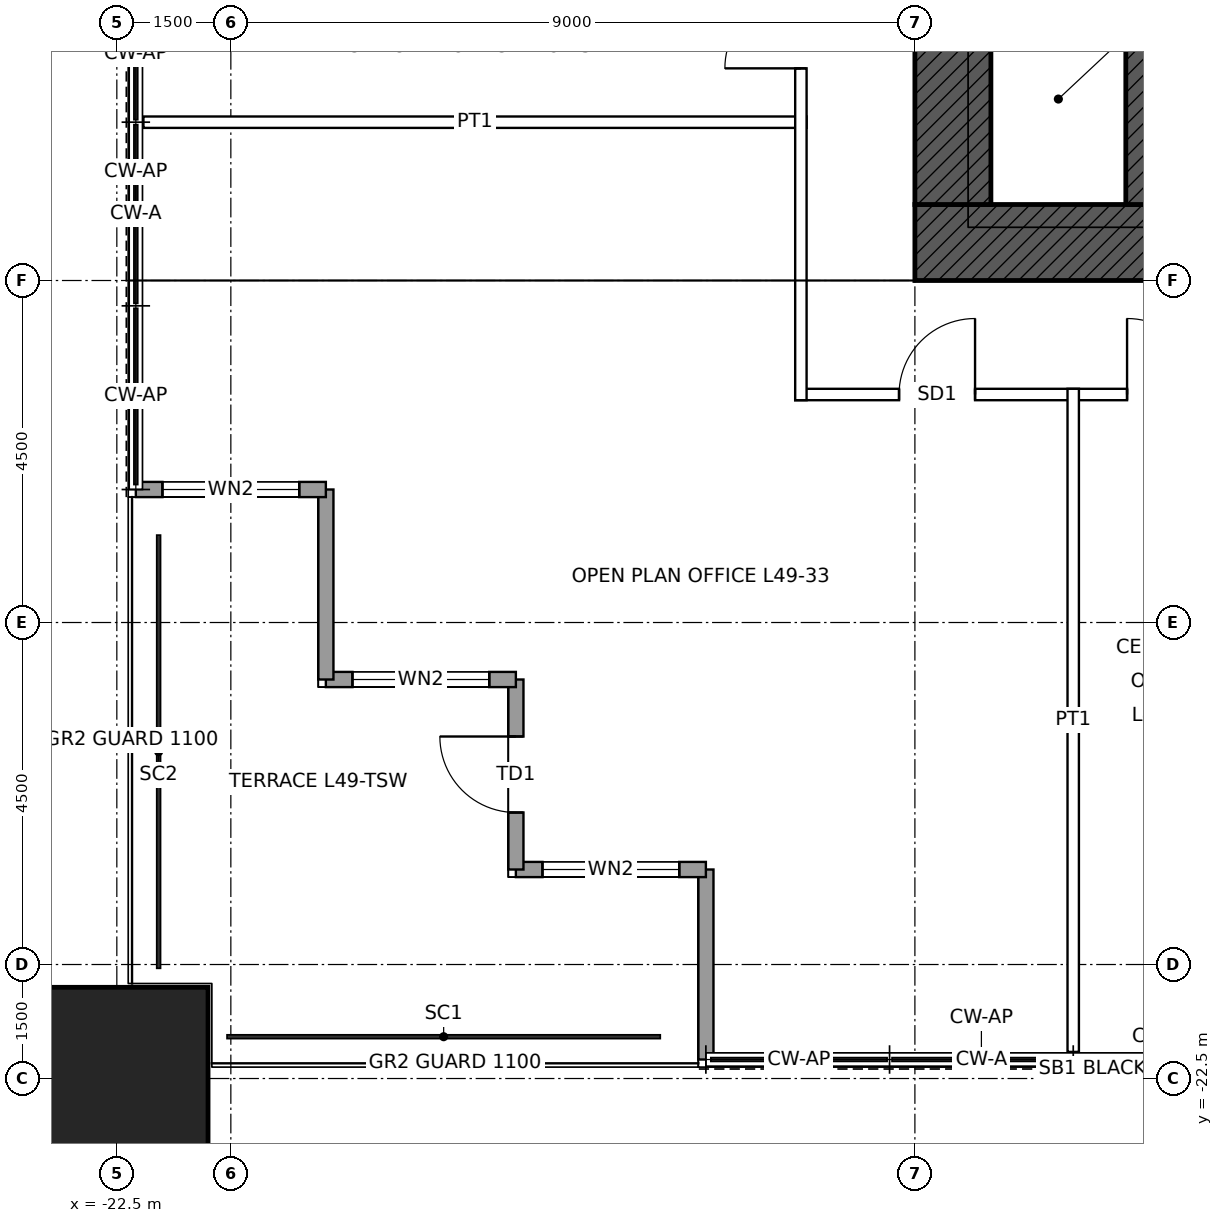
"""IFC4 building model, lengths in metres.
Left out: names, types, materials, properties, quantities, classifications, styles, units other than length and angle.
Written with IfcOpenShell. Run it as: python <this file> out.ifc"""

import sys

from ifc_helpers import new_model, si_unit, direction, frame, frame_2d, origin, origin_2d, place, context, subcontext, project, spatial, rectangle, hollow_rectangle, extrude, element, fill, save


model = new_model("IFC4")
c1 = context("Model", 3, precision=1e-05, world=origin(), true_north=direction((0.0, 1.0)))
c2 = subcontext(c1, "Body", "Model", "MODEL_VIEW")
j1 = project(units=[si_unit("LENGTHUNIT", "METRE"), si_unit("PLANEANGLEUNIT", "RADIAN")], contexts=[c1])
p1 = place(None, origin())
s1 = spatial("IfcSite", under=j1, at=p1, CompositionType="ELEMENT")
p2 = place(p1, origin())
s2 = spatial("IfcBuilding", under=s1, at=p2, CompositionType="ELEMENT")
p3 = place(p2, frame((0.0, 0.0, 229.9)))
s3 = spatial("IfcBuildingStorey", under=s2, at=p3, CompositionType="ELEMENT", Elevation=229.9)
p4 = place(p3, frame((-22.5, -22.5, 0.0), z_axis=(0.0, 0.0, 1.0), x_axis=(1.0, 0.0, 0.0)))
e1 = element("IfcColumn", 1, at=p4, inside=s3, PredefinedType="COLUMN", context=c2, shape_type="SweptSolid", body=[
    extrude(hollow_rectangle(XDim=2.4, YDim=2.4, WallThickness=0.12, at=origin_2d()), origin(), (0.0, 0.0, 1.0), 4.0),
])
p5 = place(p3, frame((12.0, -11.5, 0.0), z_axis=(0.0, 0.0, 1.0), x_axis=(-1.0, 0.0, 0.0)))
e2 = element("IfcWall", 2, at=p5, inside=s3, PredefinedType="SHEAR", context=c2, shape_type="SweptSolid", body=[
    extrude(rectangle(XDim=24.0, YDim=1.0, at=frame_2d((12.0, 0.0))), origin(), (0.0, 0.0, 1.0), 4.0),
])
p6 = place(p5, frame((11.5, 0.0, 0.0)))
e3 = element("IfcOpeningElement", 3, at=p6, cuts=e2, PredefinedType="OPENING", context=c2, shape_type="SweptSolid", body=[
    extrude(rectangle(XDim=1.0, YDim=2.1, at=frame_2d((0.5, 1.05))), frame((0.0, 0.51, 0.0), z_axis=(0.0, -1.0, 0.0), x_axis=(1.0, 0.0, 0.0)), (0.0, 0.0, 1.0), 1.02),
])
p7 = place(p5, frame((1.0, 0.0, 0.0)))
e4 = element("IfcOpeningElement", 4, at=p7, cuts=e2, PredefinedType="OPENING", context=c2, shape_type="SweptSolid", body=[
    extrude(rectangle(XDim=1.0, YDim=2.4, at=frame_2d((0.5, 1.2))), frame((0.0, 0.51, 0.0), z_axis=(0.0, -1.0, 0.0), x_axis=(1.0, 0.0, 0.0)), (0.0, 0.0, 1.0), 1.02),
])
p8 = place(p3, frame((-11.5, -11.0, 0.0), z_axis=(0.0, 0.0, 1.0), x_axis=(0.0, 1.0, 0.0)))
e5 = element("IfcWall", 5, at=p8, inside=s3, PredefinedType="SHEAR", context=c2, shape_type="SweptSolid", body=[
    extrude(rectangle(XDim=22.0, YDim=1.0, at=frame_2d((11.0, 0.0))), origin(), (0.0, 0.0, 1.0), 4.0),
])
p9 = place(p8, frame((10.5, 0.0, 0.0)))
e6 = element("IfcOpeningElement", 6, at=p9, cuts=e5, PredefinedType="OPENING", context=c2, shape_type="SweptSolid", body=[
    extrude(rectangle(XDim=1.0, YDim=2.4, at=frame_2d((0.5, 1.2))), frame((0.0, 0.51, 0.0), z_axis=(0.0, -1.0, 0.0), x_axis=(1.0, 0.0, 0.0)), (0.0, 0.0, 1.0), 1.02),
])
p10 = place(p3, frame((-9.0, -11.0, 0.0), z_axis=(0.0, 0.0, 1.0), x_axis=(0.0, 1.0, 0.0)))
e7 = element("IfcWall", 7, at=p10, inside=s3, PredefinedType="SHEAR", context=c2, shape_type="SweptSolid", body=[
    extrude(rectangle(XDim=6.5, YDim=0.45, at=frame_2d((3.25, 0.0))), origin(), (0.0, 0.0, 1.0), 4.0),
])
p11 = place(p10, frame((4.25, 0.0, 0.0)))
e8 = element("IfcOpeningElement", 8, at=p11, cuts=e7, PredefinedType="OPENING", context=c2, shape_type="SweptSolid", body=[
    extrude(rectangle(XDim=1.0, YDim=2.1, at=frame_2d((0.5, 1.05))), frame((0.0, 0.235, 0.0), z_axis=(0.0, -1.0, 0.0), x_axis=(1.0, 0.0, 0.0)), (0.0, 0.0, 1.0), 0.47),
])
p12 = place(p3, frame((-14.75, -22.25, 0.0), z_axis=(0.0, 0.0, 1.0), x_axis=(0.0, 1.0, 0.0)))
e9 = element("IfcWall", 9, at=p12, inside=s3, PredefinedType="SOLIDWALL", context=c2, shape_type="SweptSolid", body=[
    extrude(rectangle(XDim=2.5, YDim=0.2, at=frame_2d((1.25, 0.0))), origin(), (0.0, 0.0, 1.0), 3.85),
])
p13 = place(p3, frame((-14.75, -19.75, 0.0), z_axis=(0.0, 0.0, 1.0), x_axis=(-1.0, 0.0, 0.0)))
e10 = element("IfcWall", 10, at=p13, inside=s3, PredefinedType="SOLIDWALL", context=c2, shape_type="SweptSolid", body=[
    extrude(rectangle(XDim=2.5, YDim=0.2, at=frame_2d((1.25, 0.0))), origin(), (0.0, 0.0, 1.0), 3.85),
])
p14 = place(p13, frame((0.35, 0.0, 0.3)))
e11 = element("IfcOpeningElement", 11, at=p14, cuts=e10, PredefinedType="OPENING", context=c2, shape_type="SweptSolid", body=[
    extrude(rectangle(XDim=1.8, YDim=2.4, at=frame_2d((0.9, 1.2))), frame((0.0, 0.11, 0.0), z_axis=(0.0, -1.0, 0.0), x_axis=(1.0, 0.0, 0.0)), (0.0, 0.0, 1.0), 0.22),
])
p15 = place(p3, frame((-17.25, -19.75, 0.0), z_axis=(0.0, 0.0, 1.0), x_axis=(0.0, 1.0, 0.0)))
e12 = element("IfcWall", 12, at=p15, inside=s3, PredefinedType="SOLIDWALL", context=c2, shape_type="SweptSolid", body=[
    extrude(rectangle(XDim=2.5, YDim=0.2, at=frame_2d((1.25, 0.0))), origin(), (0.0, 0.0, 1.0), 3.85),
])
p16 = place(p15, frame((0.75, 0.0, 0.0)))
e13 = element("IfcOpeningElement", 13, at=p16, cuts=e12, PredefinedType="OPENING", context=c2, shape_type="SweptSolid", body=[
    extrude(rectangle(XDim=1.0, YDim=2.4, at=frame_2d((0.5, 1.2))), frame((0.0, 0.11, 0.0), z_axis=(0.0, -1.0, 0.0), x_axis=(1.0, 0.0, 0.0)), (0.0, 0.0, 1.0), 0.22),
])
p17 = place(p3, frame((-17.25, -17.25, 0.0), z_axis=(0.0, 0.0, 1.0), x_axis=(-1.0, 0.0, 0.0)))
e14 = element("IfcWall", 14, at=p17, inside=s3, PredefinedType="SOLIDWALL", context=c2, shape_type="SweptSolid", body=[
    extrude(rectangle(XDim=2.5, YDim=0.2, at=frame_2d((1.25, 0.0))), origin(), (0.0, 0.0, 1.0), 3.85),
])
p18 = place(p17, frame((0.35, 0.0, 0.3)))
e15 = element("IfcOpeningElement", 15, at=p18, cuts=e14, PredefinedType="OPENING", context=c2, shape_type="SweptSolid", body=[
    extrude(rectangle(XDim=1.8, YDim=2.4, at=frame_2d((0.9, 1.2))), frame((0.0, 0.11, 0.0), z_axis=(0.0, -1.0, 0.0), x_axis=(1.0, 0.0, 0.0)), (0.0, 0.0, 1.0), 0.22),
])
p19 = place(p3, frame((-19.75, -17.25, 0.0), z_axis=(0.0, 0.0, 1.0), x_axis=(0.0, 1.0, 0.0)))
e16 = element("IfcWall", 16, at=p19, inside=s3, PredefinedType="SOLIDWALL", context=c2, shape_type="SweptSolid", body=[
    extrude(rectangle(XDim=2.5, YDim=0.2, at=frame_2d((1.25, 0.0))), origin(), (0.0, 0.0, 1.0), 3.85),
])
p20 = place(p3, frame((-19.75, -14.75, 0.0), z_axis=(0.0, 0.0, 1.0), x_axis=(-1.0, 0.0, 0.0)))
e17 = element("IfcWall", 17, at=p20, inside=s3, PredefinedType="SOLIDWALL", context=c2, shape_type="SweptSolid", body=[
    extrude(rectangle(XDim=2.5, YDim=0.2, at=frame_2d((1.25, 0.0))), origin(), (0.0, 0.0, 1.0), 3.85),
])
p21 = place(p20, frame((0.35, 0.0, 0.3)))
e18 = element("IfcOpeningElement", 18, at=p21, cuts=e17, PredefinedType="OPENING", context=c2, shape_type="SweptSolid", body=[
    extrude(rectangle(XDim=1.8, YDim=2.4, at=frame_2d((0.9, 1.2))), frame((0.0, 0.11, 0.0), z_axis=(0.0, -1.0, 0.0), x_axis=(1.0, 0.0, 0.0)), (0.0, 0.0, 1.0), 0.22),
])
p22 = place(p3, frame((-13.575, -13.5, 0.0), z_axis=(0.0, 0.0, 1.0), x_axis=(1.0, 0.0, 0.0)))
e19 = element("IfcWall", 19, at=p22, inside=s3, PredefinedType="PARTITIONING", context=c2, shape_type="SweptSolid", body=[
    extrude(rectangle(XDim=27.15, YDim=0.15, at=frame_2d((13.575, 0.0))), origin(), (0.0, 0.0, 1.0), 3.85),
])
p23 = place(p22, frame((21.783, 0.0, 0.0)))
e20 = element("IfcOpeningElement", 20, at=p23, cuts=e19, PredefinedType="OPENING", context=c2, shape_type="SweptSolid", body=[
    extrude(rectangle(XDim=1.0, YDim=2.1, at=frame_2d((0.5, 1.05))), frame((0.0, 0.085, 0.0), z_axis=(0.0, -1.0, 0.0), x_axis=(1.0, 0.0, 0.0)), (0.0, 0.0, 1.0), 0.17),
])
p24 = place(p22, frame((19.325, 0.0, 0.0)))
e21 = element("IfcOpeningElement", 21, at=p24, cuts=e19, PredefinedType="OPENING", context=c2, shape_type="SweptSolid", body=[
    extrude(rectangle(XDim=1.0, YDim=2.1, at=frame_2d((0.5, 1.05))), frame((0.0, 0.085, 0.0), z_axis=(0.0, -1.0, 0.0), x_axis=(1.0, 0.0, 0.0)), (0.0, 0.0, 1.0), 0.17),
])
p25 = place(p22, frame((16.825, 0.0, 0.0)))
e22 = element("IfcOpeningElement", 22, at=p25, cuts=e19, PredefinedType="OPENING", context=c2, shape_type="SweptSolid", body=[
    extrude(rectangle(XDim=1.0, YDim=2.1, at=frame_2d((0.5, 1.05))), frame((0.0, 0.085, 0.0), z_axis=(0.0, -1.0, 0.0), x_axis=(1.0, 0.0, 0.0)), (0.0, 0.0, 1.0), 0.17),
])
p26 = place(p22, frame((14.675, 0.0, 0.0)))
e23 = element("IfcOpeningElement", 23, at=p26, cuts=e19, PredefinedType="OPENING", context=c2, shape_type="SweptSolid", body=[
    extrude(rectangle(XDim=1.0, YDim=2.1, at=frame_2d((0.5, 1.05))), frame((0.0, 0.085, 0.0), z_axis=(0.0, -1.0, 0.0), x_axis=(1.0, 0.0, 0.0)), (0.0, 0.0, 1.0), 0.17),
])
p27 = place(p22, frame((11.475, 0.0, 0.0)))
e24 = element("IfcOpeningElement", 24, at=p27, cuts=e19, PredefinedType="OPENING", context=c2, shape_type="SweptSolid", body=[
    extrude(rectangle(XDim=1.0, YDim=2.1, at=frame_2d((0.5, 1.05))), frame((0.0, 0.085, 0.0), z_axis=(0.0, -1.0, 0.0), x_axis=(1.0, 0.0, 0.0)), (0.0, 0.0, 1.0), 0.17),
])
p28 = place(p22, frame((9.325, 0.0, 0.0)))
e25 = element("IfcOpeningElement", 25, at=p28, cuts=e19, PredefinedType="OPENING", context=c2, shape_type="SweptSolid", body=[
    extrude(rectangle(XDim=1.0, YDim=2.1, at=frame_2d((0.5, 1.05))), frame((0.0, 0.085, 0.0), z_axis=(0.0, -1.0, 0.0), x_axis=(1.0, 0.0, 0.0)), (0.0, 0.0, 1.0), 0.17),
])
p29 = place(p22, frame((6.825, 0.0, 0.0)))
e26 = element("IfcOpeningElement", 26, at=p29, cuts=e19, PredefinedType="OPENING", context=c2, shape_type="SweptSolid", body=[
    extrude(rectangle(XDim=1.0, YDim=2.1, at=frame_2d((0.5, 1.05))), frame((0.0, 0.085, 0.0), z_axis=(0.0, -1.0, 0.0), x_axis=(1.0, 0.0, 0.0)), (0.0, 0.0, 1.0), 0.17),
])
p30 = place(p22, frame((4.366, 0.0, 0.0)))
e27 = element("IfcOpeningElement", 27, at=p30, cuts=e19, PredefinedType="OPENING", context=c2, shape_type="SweptSolid", body=[
    extrude(rectangle(XDim=1.0, YDim=2.1, at=frame_2d((0.5, 1.05))), frame((0.0, 0.085, 0.0), z_axis=(0.0, -1.0, 0.0), x_axis=(1.0, 0.0, 0.0)), (0.0, 0.0, 1.0), 0.17),
])
p31 = place(p22, frame((25.318, 0.0, 0.0)))
e28 = element("IfcOpeningElement", 28, at=p31, cuts=e19, PredefinedType="OPENING", context=c2, shape_type="SweptSolid", body=[
    extrude(rectangle(XDim=1.0, YDim=2.4, at=frame_2d((0.5, 1.2))), frame((0.0, 0.085, 0.0), z_axis=(0.0, -1.0, 0.0), x_axis=(1.0, 0.0, 0.0)), (0.0, 0.0, 1.0), 0.17),
])
p32 = place(p22, frame((1.366, 0.0, 0.0)))
e29 = element("IfcOpeningElement", 29, at=p32, cuts=e19, PredefinedType="OPENING", context=c2, shape_type="SweptSolid", body=[
    extrude(rectangle(XDim=1.0, YDim=2.4, at=frame_2d((0.5, 1.2))), frame((0.0, 0.085, 0.0), z_axis=(0.0, -1.0, 0.0), x_axis=(1.0, 0.0, 0.0)), (0.0, 0.0, 1.0), 0.17),
])
p33 = place(p3, frame((-22.15, -9.917, 0.0), z_axis=(0.0, 0.0, 1.0), x_axis=(1.0, 0.0, 0.0)))
e30 = element("IfcWall", 30, at=p33, inside=s3, PredefinedType="PARTITIONING", context=c2, shape_type="SweptSolid", body=[
    extrude(rectangle(XDim=8.725, YDim=0.15, at=frame_2d((4.362, 0.0))), origin(), (0.0, 0.0, 1.0), 3.85),
])
p34 = place(p3, frame((-13.5, -13.575, 0.0), z_axis=(0.0, 0.0, 1.0), x_axis=(0.0, 1.0, 0.0)))
e31 = element("IfcWall", 31, at=p34, inside=s3, PredefinedType="PARTITIONING", context=c2, shape_type="SweptSolid", body=[
    extrude(rectangle(XDim=13.65, YDim=0.15, at=frame_2d((6.825, 0.0))), origin(), (0.0, 0.0, 1.0), 3.85),
])
p35 = place(p34, frame((4.366, 0.0, 0.0)))
e32 = element("IfcOpeningElement", 32, at=p35, cuts=e31, PredefinedType="OPENING", context=c2, shape_type="SweptSolid", body=[
    extrude(rectangle(XDim=1.0, YDim=2.1, at=frame_2d((0.5, 1.05))), frame((0.0, 0.085, 0.0), z_axis=(0.0, -1.0, 0.0), x_axis=(1.0, 0.0, 0.0)), (0.0, 0.0, 1.0), 0.17),
])
p36 = place(p34, frame((6.825, 0.0, 0.0)))
e33 = element("IfcOpeningElement", 33, at=p36, cuts=e31, PredefinedType="OPENING", context=c2, shape_type="SweptSolid", body=[
    extrude(rectangle(XDim=1.0, YDim=2.1, at=frame_2d((0.5, 1.05))), frame((0.0, 0.085, 0.0), z_axis=(0.0, -1.0, 0.0), x_axis=(1.0, 0.0, 0.0)), (0.0, 0.0, 1.0), 0.17),
])
p37 = place(p34, frame((9.325, 0.0, 0.0)))
e34 = element("IfcOpeningElement", 34, at=p37, cuts=e31, PredefinedType="OPENING", context=c2, shape_type="SweptSolid", body=[
    extrude(rectangle(XDim=1.0, YDim=2.1, at=frame_2d((0.5, 1.05))), frame((0.0, 0.085, 0.0), z_axis=(0.0, -1.0, 0.0), x_axis=(1.0, 0.0, 0.0)), (0.0, 0.0, 1.0), 0.17),
])
p38 = place(p34, frame((11.475, 0.0, 0.0)))
e35 = element("IfcOpeningElement", 35, at=p38, cuts=e31, PredefinedType="OPENING", context=c2, shape_type="SweptSolid", body=[
    extrude(rectangle(XDim=1.0, YDim=2.1, at=frame_2d((0.5, 1.05))), frame((0.0, 0.085, 0.0), z_axis=(0.0, -1.0, 0.0), x_axis=(1.0, 0.0, 0.0)), (0.0, 0.0, 1.0), 0.17),
])
p39 = place(p3, frame((-9.917, -22.15, 0.0), z_axis=(0.0, 0.0, 1.0), x_axis=(0.0, 1.0, 0.0)))
e36 = element("IfcWall", 36, at=p39, inside=s3, PredefinedType="PARTITIONING", context=c2, shape_type="SweptSolid", body=[
    extrude(rectangle(XDim=8.725, YDim=0.15, at=frame_2d((4.362, 0.0))), origin(), (0.0, 0.0, 1.0), 3.85),
])
p40 = place(p14, origin())
e37 = element("IfcWindow", 37, at=p40, inside=s3, PartitioningType="SINGLE_PANEL", PredefinedType="WINDOW", context=c2, shape_type="SweptSolid", body=[
    extrude(rectangle(XDim=1.8, YDim=2.4, at=frame_2d((0.9, 1.2))), frame((0.0, 0.03, 0.0), z_axis=(0.0, -1.0, 0.0), x_axis=(1.0, 0.0, 0.0)), (0.0, 0.0, 1.0), 0.06),
])
fill(e11, e37)
p41 = place(p16, origin())
e38 = element("IfcDoor", 38, at=p41, inside=s3, OperationType="SINGLE_SWING_RIGHT", PredefinedType="DOOR", context=c2, shape_type="SweptSolid", body=[
    extrude(rectangle(XDim=1.0, YDim=2.4, at=frame_2d((0.5, 1.2))), frame((0.0, 0.025, 0.0), z_axis=(0.0, -1.0, 0.0), x_axis=(1.0, 0.0, 0.0)), (0.0, 0.0, 1.0), 0.05),
])
fill(e13, e38)
p42 = place(p18, origin())
e39 = element("IfcWindow", 39, at=p42, inside=s3, PartitioningType="SINGLE_PANEL", PredefinedType="WINDOW", context=c2, shape_type="SweptSolid", body=[
    extrude(rectangle(XDim=1.8, YDim=2.4, at=frame_2d((0.9, 1.2))), frame((0.0, 0.03, 0.0), z_axis=(0.0, -1.0, 0.0), x_axis=(1.0, 0.0, 0.0)), (0.0, 0.0, 1.0), 0.06),
])
fill(e15, e39)
p43 = place(p21, origin())
e40 = element("IfcWindow", 40, at=p43, inside=s3, PartitioningType="SINGLE_PANEL", PredefinedType="WINDOW", context=c2, shape_type="SweptSolid", body=[
    extrude(rectangle(XDim=1.8, YDim=2.4, at=frame_2d((0.9, 1.2))), frame((0.0, 0.03, 0.0), z_axis=(0.0, -1.0, 0.0), x_axis=(1.0, 0.0, 0.0)), (0.0, 0.0, 1.0), 0.06),
])
fill(e18, e40)
p44 = place(p30, origin())
e41 = element("IfcDoor", 41, at=p44, inside=s3, OperationType="SINGLE_SWING_LEFT", PredefinedType="DOOR", context=c2, shape_type="SweptSolid", body=[
    extrude(rectangle(XDim=1.0, YDim=2.1, at=frame_2d((0.5, 1.05))), frame((0.0, 0.025, 0.0), z_axis=(0.0, -1.0, 0.0), x_axis=(1.0, 0.0, 0.0)), (0.0, 0.0, 1.0), 0.05),
])
fill(e27, e41)
p45 = place(p35, origin())
e42 = element("IfcDoor", 42, at=p45, inside=s3, OperationType="SINGLE_SWING_LEFT", PredefinedType="DOOR", context=c2, shape_type="SweptSolid", body=[
    extrude(rectangle(XDim=1.0, YDim=2.1, at=frame_2d((0.5, 1.05))), frame((0.0, 0.025, 0.0), z_axis=(0.0, -1.0, 0.0), x_axis=(1.0, 0.0, 0.0)), (0.0, 0.0, 1.0), 0.05),
])
fill(e32, e42)
p46 = place(p32, origin())
e43 = element("IfcDoor", 43, at=p46, inside=s3, OperationType="SINGLE_SWING_RIGHT", PredefinedType="DOOR", context=c2, shape_type="SweptSolid", body=[
    extrude(rectangle(XDim=1.0, YDim=2.4, at=frame_2d((0.5, 1.2))), frame((0.0, 0.025, 0.0), z_axis=(0.0, -1.0, 0.0), x_axis=(1.0, 0.0, 0.0)), (0.0, 0.0, 1.0), 0.05),
])
fill(e29, e43)
save(model, sys.argv[1])
